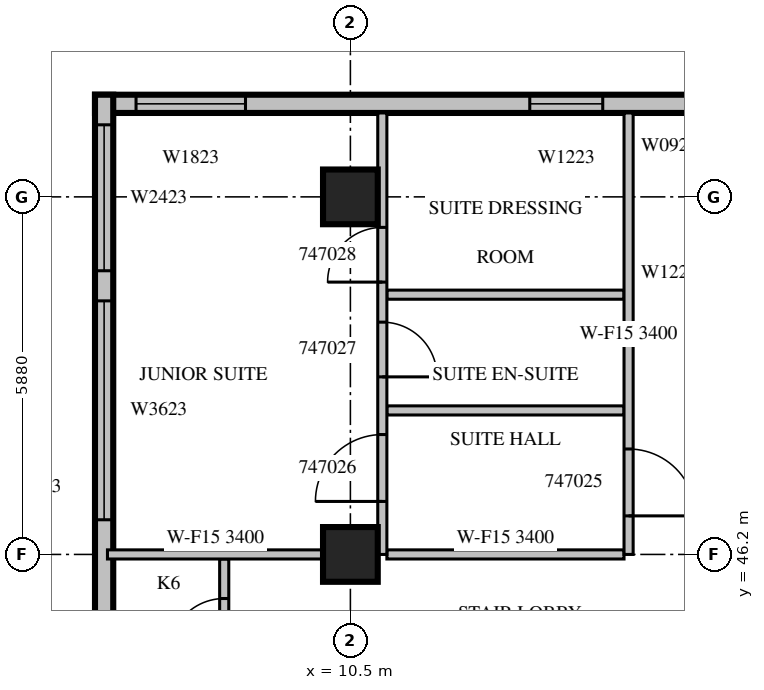
"""IFC4 building model, lengths in metres.
Left out: names, types, materials, properties, quantities, classifications, styles, units other than length and angle.
Written with IfcOpenShell. Run it as: python <this file> out.ifc"""

import sys

from ifc_helpers import new_model, si_unit, direction, frame, frame_2d, origin, origin_2d, place, context, subcontext, project, spatial, rectangle, extrude, source, transform, mapped, element, fill, save


model = new_model("IFC4")
c1 = context("Model", 3, precision=1e-05, world=origin(), true_north=direction((0.0, 1.0)))
c2 = subcontext(c1, "Body", "Model", "MODEL_VIEW")
j1 = project(units=[si_unit("LENGTHUNIT", "METRE"), si_unit("PLANEANGLEUNIT", "RADIAN")], contexts=[c1])
p1 = place(None, origin())
s1 = spatial("IfcSite", under=j1, at=p1, CompositionType="ELEMENT")
p2 = place(p1, origin())
s2 = spatial("IfcBuilding", under=s1, at=p2, CompositionType="ELEMENT")
p3 = place(p2, frame((0.0, 0.0, 212.0)))
s3 = spatial("IfcBuildingStorey", under=s2, at=p3, CompositionType="ELEMENT", Elevation=212.0)
m1 = source(origin(), c2, "Body", "SweptSolid", [
    extrude(rectangle(XDim=0.9, YDim=0.9, at=origin_2d()), origin(), (0.0, 0.0, 1.0), 3.8),
])
for number, where, z_axis, x_axis in (
    (1, (10.5, 46.2, 0.0), (0.0, 0.0, 1.0), (1.0, 0.0, 0.0)),
    (2, (10.5, 52.08, 0.0), (0.0, 0.0, 1.0), (1.0, 0.0, 0.0)),
):
    element("IfcColumn", number, at=place(p3, frame(where, z_axis=z_axis, x_axis=x_axis)), inside=s3, PredefinedType="COLUMN", context=c2, shape_type="MappedRepresentation", body=[
        mapped(m1, transform((0.0, 0.0, 0.0), scale=1.0)),
    ])
m2 = source(origin(), c2, "Body", "SweptSolid", [
    extrude(rectangle(XDim=10.5, YDim=0.3, at=frame_2d((5.25, 0.0))), origin(), (0.0, 0.0, 1.0), 3.4),
])
p4 = place(p3, frame((16.8, 53.61, 0.0), z_axis=(0.0, 0.0, 1.0), x_axis=(-1.0, 0.0, 0.0)))
e3 = element("IfcWall", 3, at=p4, inside=s3, PredefinedType="STANDARD", context=c2, shape_type="MappedRepresentation", body=[
    mapped(m2, transform((0.0, 0.0, 0.0), scale=1.0)),
])
m3 = source(origin(), c2, "Body", "SweptSolid", [
    extrude(rectangle(XDim=1.2, YDim=2.3, at=frame_2d((0.6, 1.15))), frame((0.0, 0.16, 0.0), z_axis=(0.0, -1.0, 0.0), x_axis=(1.0, 0.0, 0.0)), (0.0, 0.0, 1.0), 0.32),
])
p5 = place(p4, frame((2.15, 0.0, 0.6)))
e4 = element("IfcOpeningElement", 4, at=p5, cuts=e3, PredefinedType="OPENING", context=c2, shape_type="MappedRepresentation", body=[
    mapped(m3, transform((0.0, 0.0, 0.0), scale=1.0)),
])
m4 = source(origin(), c2, "Body", "SweptSolid", [
    extrude(rectangle(XDim=1.8, YDim=2.3, at=frame_2d((0.9, 1.15))), frame((0.0, 0.16, 0.0), z_axis=(0.0, -1.0, 0.0), x_axis=(1.0, 0.0, 0.0)), (0.0, 0.0, 1.0), 0.32),
])
p6 = place(p4, frame((8.025, 0.0, 0.6)))
e5 = element("IfcOpeningElement", 5, at=p6, cuts=e3, PredefinedType="OPENING", context=c2, shape_type="MappedRepresentation", body=[
    mapped(m4, transform((0.0, 0.0, 0.0), scale=1.0)),
])
m5 = source(origin(), c2, "Body", "SweptSolid", [
    extrude(rectangle(XDim=9.91, YDim=0.3, at=frame_2d((4.955, 0.0))), origin(), (0.0, 0.0, 1.0), 3.4),
])
p7 = place(p3, frame((6.45, 53.76, 0.0), z_axis=(0.0, 0.0, 1.0), x_axis=(0.0, -1.0, 0.0)))
e6 = element("IfcWall", 6, at=p7, inside=s3, PredefinedType="STANDARD", context=c2, shape_type="MappedRepresentation", body=[
    mapped(m5, transform((0.0, 0.0, 0.0), scale=1.0)),
])
m6 = source(origin(), c2, "Body", "SweptSolid", [
    extrude(rectangle(XDim=3.6, YDim=2.3, at=frame_2d((1.8, 1.15))), frame((0.0, 0.16, 0.0), z_axis=(0.0, -1.0, 0.0), x_axis=(1.0, 0.0, 0.0)), (0.0, 0.0, 1.0), 0.32),
])
p8 = place(p7, frame((3.39, 0.0, 0.6)))
e7 = element("IfcOpeningElement", 7, at=p8, cuts=e6, PredefinedType="OPENING", context=c2, shape_type="MappedRepresentation", body=[
    mapped(m6, transform((0.0, 0.0, 0.0), scale=1.0)),
])
m7 = source(origin(), c2, "Body", "SweptSolid", [
    extrude(rectangle(XDim=2.4, YDim=2.3, at=frame_2d((1.2, 1.15))), frame((0.0, 0.16, 0.0), z_axis=(0.0, -1.0, 0.0), x_axis=(1.0, 0.0, 0.0)), (0.0, 0.0, 1.0), 0.32),
])
p9 = place(p7, frame((0.495, 0.0, 0.6)))
e8 = element("IfcOpeningElement", 8, at=p9, cuts=e6, PredefinedType="OPENING", context=c2, shape_type="MappedRepresentation", body=[
    mapped(m7, transform((0.0, 0.0, 0.0), scale=1.0)),
])
m8 = source(origin(), c2, "Body", "SweptSolid", [
    extrude(rectangle(XDim=2.2, YDim=0.15, at=frame_2d((1.1, 0.0))), origin(), (0.0, 0.0, 1.0), 3.4),
])
p10 = place(p3, frame((8.425, 43.925, 0.0), z_axis=(0.0, 0.0, 1.0), x_axis=(0.0, 1.0, 0.0)))
e9 = element("IfcWall", 9, at=p10, inside=s3, PredefinedType="PARTITIONING", context=c2, shape_type="MappedRepresentation", body=[
    mapped(m8, transform((0.0, 0.0, 0.0), scale=1.0)),
])
m9 = source(origin(), c2, "Body", "SweptSolid", [
    extrude(rectangle(XDim=0.9, YDim=2.1, at=frame_2d((0.45, 1.05))), frame((0.0, 0.085, 0.0), z_axis=(0.0, -1.0, 0.0), x_axis=(1.0, 0.0, 0.0)), (0.0, 0.0, 1.0), 0.17),
])
p11 = place(p10, frame((0.65, 0.0, 0.0)))
e10 = element("IfcOpeningElement", 10, at=p11, cuts=e9, PredefinedType="OPENING", context=c2, shape_type="MappedRepresentation", body=[
    mapped(m9, transform((0.0, 0.0, 0.0), scale=1.0)),
])
m10 = source(origin(), c2, "Body", "SweptSolid", [
    extrude(rectangle(XDim=3.9, YDim=0.15, at=frame_2d((1.95, 0.0))), origin(), (0.0, 0.0, 1.0), 3.4),
])
for number, where, z_axis, x_axis in (
    (11, (15.0, 48.568, 0.0), (0.0, 0.0, 1.0), (-1.0, 0.0, 0.0)),
    (12, (15.0, 50.472, 0.0), (0.0, 0.0, 1.0), (-1.0, 0.0, 0.0)),
):
    element("IfcWall", number, at=place(p3, frame(where, z_axis=z_axis, x_axis=x_axis)), inside=s3, PredefinedType="PARTITIONING", context=c2, shape_type="MappedRepresentation", body=[
        mapped(m10, transform((0.0, 0.0, 0.0), scale=1.0)),
    ])
m11 = source(origin(), c2, "Body", "SweptSolid", [
    extrude(rectangle(XDim=3.546, YDim=0.15, at=frame_2d((1.773, 0.0))), origin(), (0.0, 0.0, 1.0), 3.4),
])
p12 = place(p3, frame((10.051, 46.2, 0.0), z_axis=(0.0, 0.0, 1.0), x_axis=(-1.0, 0.0, 0.0)))
e13 = element("IfcWall", 13, at=p12, inside=s3, PredefinedType="PARTITIONING", context=c2, shape_type="MappedRepresentation", body=[
    mapped(m11, transform((0.0, 0.0, 0.0), scale=1.0)),
])
p13 = place(p3, frame((15.0, 46.2, 0.0), z_axis=(0.0, 0.0, 1.0), x_axis=(-1.0, 0.0, 0.0)))
e14 = element("IfcWall", 14, at=p13, inside=s3, PredefinedType="PARTITIONING", context=c2, shape_type="MappedRepresentation", body=[
    mapped(m10, transform((0.0, 0.0, 0.0), scale=1.0)),
])
m12 = source(origin(), c2, "Body", "SweptSolid", [
    extrude(rectangle(XDim=7.26, YDim=0.15, at=frame_2d((3.63, 0.0))), origin(), (0.0, 0.0, 1.0), 3.4),
])
p14 = place(p3, frame((11.025, 46.2, 0.0), z_axis=(0.0, 0.0, 1.0), x_axis=(0.0, 1.0, 0.0)))
e15 = element("IfcWall", 15, at=p14, inside=s3, PredefinedType="PARTITIONING", context=c2, shape_type="MappedRepresentation", body=[
    mapped(m12, transform((0.0, 0.0, 0.0), scale=1.0)),
])
m13 = source(origin(), c2, "Body", "SweptSolid", [
    extrude(rectangle(XDim=1.1, YDim=2.1, at=frame_2d((0.55, 1.05))), frame((0.0, 0.085, 0.0), z_axis=(0.0, -1.0, 0.0), x_axis=(1.0, 0.0, 0.0)), (0.0, 0.0, 1.0), 0.17),
])
p15 = place(p14, frame((0.872, 0.0, 0.0)))
e16 = element("IfcOpeningElement", 16, at=p15, cuts=e15, PredefinedType="OPENING", context=c2, shape_type="MappedRepresentation", body=[
    mapped(m13, transform((0.0, 0.0, 0.0), scale=1.0)),
])
p16 = place(p14, frame((2.92, 0.0, 0.0)))
e17 = element("IfcOpeningElement", 17, at=p16, cuts=e15, PredefinedType="OPENING", context=c2, shape_type="MappedRepresentation", body=[
    mapped(m9, transform((0.0, 0.0, 0.0), scale=1.0)),
])
p17 = place(p14, frame((4.478, 0.0, 0.0)))
e18 = element("IfcOpeningElement", 18, at=p17, cuts=e15, PredefinedType="OPENING", context=c2, shape_type="MappedRepresentation", body=[
    mapped(m9, transform((0.0, 0.0, 0.0), scale=1.0)),
])
p18 = place(p3, frame((15.075, 46.2, 0.0), z_axis=(0.0, 0.0, 1.0), x_axis=(0.0, 1.0, 0.0)))
e19 = element("IfcWall", 19, at=p18, inside=s3, PredefinedType="PARTITIONING", context=c2, shape_type="MappedRepresentation", body=[
    mapped(m12, transform((0.0, 0.0, 0.0), scale=1.0)),
])
p19 = place(p18, frame((0.634, 0.0, 0.0)))
e20 = element("IfcOpeningElement", 20, at=p19, cuts=e19, PredefinedType="OPENING", context=c2, shape_type="MappedRepresentation", body=[
    mapped(m13, transform((0.0, 0.0, 0.0), scale=1.0)),
])
m14 = source(origin(), c2, "Body", "SweptSolid", [
    extrude(rectangle(XDim=1.2, YDim=2.3, at=frame_2d((0.6, 1.15))), frame((0.0, 0.03, 0.0), z_axis=(0.0, -1.0, 0.0), x_axis=(1.0, 0.0, 0.0)), (0.0, 0.0, 1.0), 0.06),
])
p20 = place(p5, origin())
e21 = element("IfcWindow", 21, at=p20, inside=s3, PartitioningType="SINGLE_PANEL", PredefinedType="WINDOW", context=c2, shape_type="MappedRepresentation", body=[
    mapped(m14, transform((0.0, 0.0, 0.0), scale=1.0)),
])
fill(e4, e21)
m15 = source(origin(), c2, "Body", "SweptSolid", [
    extrude(rectangle(XDim=1.8, YDim=2.3, at=frame_2d((0.9, 1.15))), frame((0.0, 0.03, 0.0), z_axis=(0.0, -1.0, 0.0), x_axis=(1.0, 0.0, 0.0)), (0.0, 0.0, 1.0), 0.06),
])
p21 = place(p6, origin())
e22 = element("IfcWindow", 22, at=p21, inside=s3, PartitioningType="SINGLE_PANEL", PredefinedType="WINDOW", context=c2, shape_type="MappedRepresentation", body=[
    mapped(m15, transform((0.0, 0.0, 0.0), scale=1.0)),
])
fill(e5, e22)
m16 = source(origin(), c2, "Body", "SweptSolid", [
    extrude(rectangle(XDim=3.6, YDim=2.3, at=frame_2d((1.8, 1.15))), frame((0.0, 0.03, 0.0), z_axis=(0.0, -1.0, 0.0), x_axis=(1.0, 0.0, 0.0)), (0.0, 0.0, 1.0), 0.06),
])
p22 = place(p8, origin())
e23 = element("IfcWindow", 23, at=p22, inside=s3, PartitioningType="SINGLE_PANEL", PredefinedType="WINDOW", context=c2, shape_type="MappedRepresentation", body=[
    mapped(m16, transform((0.0, 0.0, 0.0), scale=1.0)),
])
fill(e7, e23)
m17 = source(origin(), c2, "Body", "SweptSolid", [
    extrude(rectangle(XDim=2.4, YDim=2.3, at=frame_2d((1.2, 1.15))), frame((0.0, 0.03, 0.0), z_axis=(0.0, -1.0, 0.0), x_axis=(1.0, 0.0, 0.0)), (0.0, 0.0, 1.0), 0.06),
])
p23 = place(p9, origin())
e24 = element("IfcWindow", 24, at=p23, inside=s3, PartitioningType="SINGLE_PANEL", PredefinedType="WINDOW", context=c2, shape_type="MappedRepresentation", body=[
    mapped(m17, transform((0.0, 0.0, 0.0), scale=1.0)),
])
fill(e8, e24)
m18 = source(origin(), c2, "Body", "SweptSolid", [
    extrude(rectangle(XDim=0.9, YDim=2.1, at=frame_2d((0.45, 1.05))), frame((0.0, 0.025, 0.0), z_axis=(0.0, -1.0, 0.0), x_axis=(1.0, 0.0, 0.0)), (0.0, 0.0, 1.0), 0.05),
])
p24 = place(p11, origin())
e25 = element("IfcDoor", 25, at=p24, inside=s3, OperationType="SINGLE_SWING_LEFT", PredefinedType="DOOR", context=c2, shape_type="MappedRepresentation", body=[
    mapped(m18, transform((0.0, 0.0, 0.0), scale=1.0)),
])
fill(e10, e25)
m19 = source(origin(), c2, "Body", "SweptSolid", [
    extrude(rectangle(XDim=1.1, YDim=2.1, at=frame_2d((0.55, 1.05))), frame((0.0, 0.025, 0.0), z_axis=(0.0, -1.0, 0.0), x_axis=(1.0, 0.0, 0.0)), (0.0, 0.0, 1.0), 0.05),
])
p25 = place(p19, origin())
e26 = element("IfcDoor", 26, at=p25, inside=s3, OperationType="SINGLE_SWING_RIGHT", PredefinedType="DOOR", context=c2, shape_type="MappedRepresentation", body=[
    mapped(m19, transform((0.0, 0.0, 0.0), scale=1.0)),
])
fill(e20, e26)
p26 = place(p15, origin())
e27 = element("IfcDoor", 27, at=p26, inside=s3, OperationType="SINGLE_SWING_LEFT", PredefinedType="DOOR", context=c2, shape_type="MappedRepresentation", body=[
    mapped(m19, transform((0.0, 0.0, 0.0), scale=1.0)),
])
fill(e16, e27)
p27 = place(p16, origin())
e28 = element("IfcDoor", 28, at=p27, inside=s3, OperationType="SINGLE_SWING_RIGHT", PredefinedType="DOOR", context=c2, shape_type="MappedRepresentation", body=[
    mapped(m18, transform((0.0, 0.0, 0.0), scale=1.0)),
])
fill(e17, e28)
p28 = place(p17, origin())
e29 = element("IfcDoor", 29, at=p28, inside=s3, OperationType="SINGLE_SWING_LEFT", PredefinedType="DOOR", context=c2, shape_type="MappedRepresentation", body=[
    mapped(m18, transform((0.0, 0.0, 0.0), scale=1.0)),
])
fill(e18, e29)
save(model, sys.argv[1])
